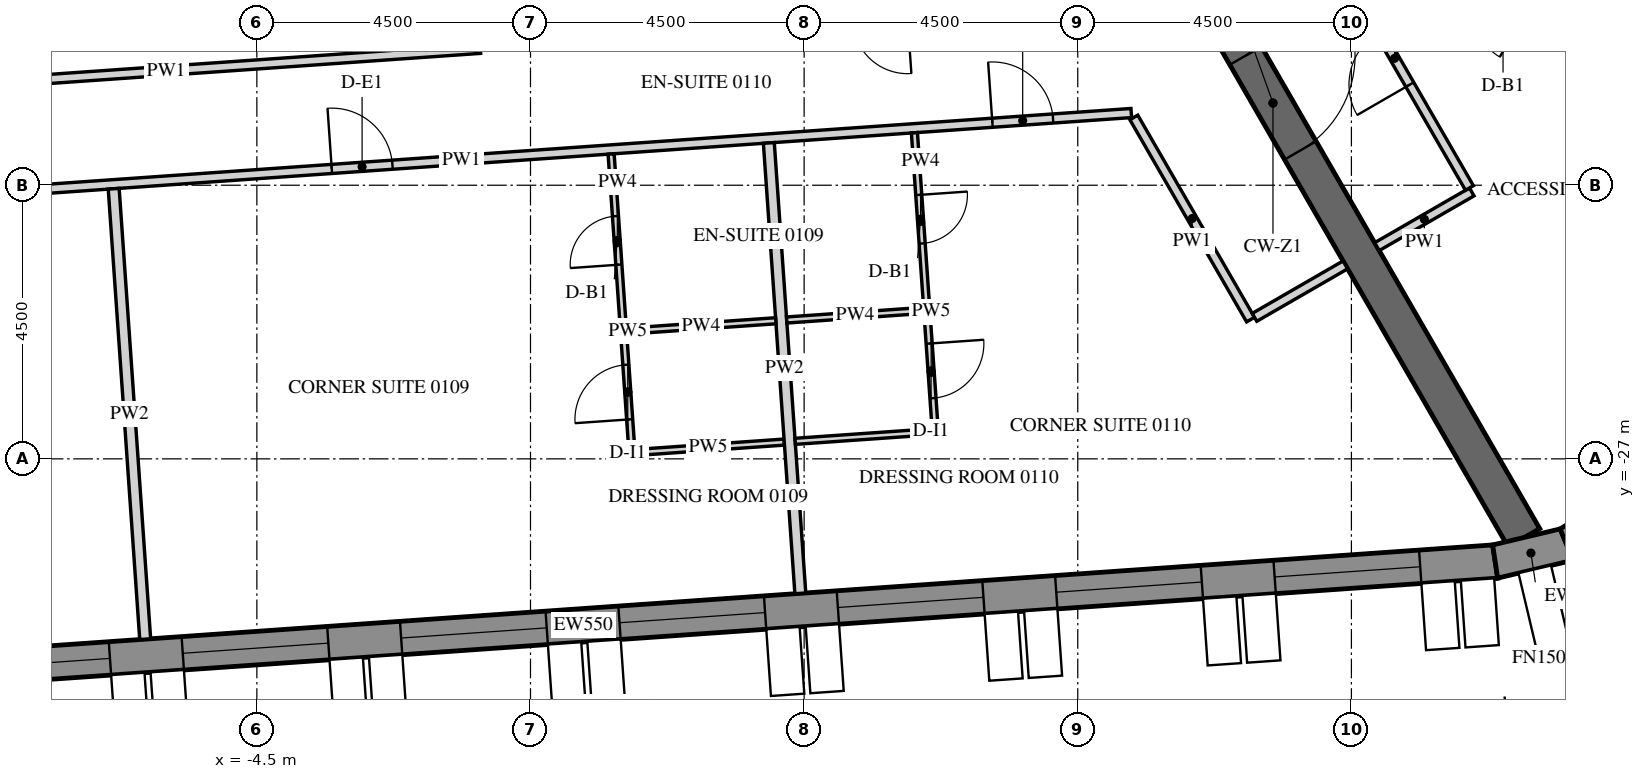
"""IFC4 building model, lengths in metres.
Left out: names, types, materials, properties, quantities, classifications, styles, units other than length and angle.
Written with IfcOpenShell. Run it as: python <this file> out.ifc"""

import sys

from ifc_helpers import new_model, si_unit, direction, frame, frame_2d, origin, place, context, subcontext, project, spatial, polyline, rectangle, outline, extrude, element, fill, save


model = new_model("IFC4")
c1 = context("Model", 3, precision=1e-05, world=origin(), true_north=direction((0.0, 1.0)))
c2 = subcontext(c1, "Body", "Model", "MODEL_VIEW")
j1 = project(units=[si_unit("LENGTHUNIT", "METRE"), si_unit("PLANEANGLEUNIT", "RADIAN")], contexts=[c1])
p1 = place(None, origin())
s1 = spatial("IfcSite", under=j1, at=p1, CompositionType="ELEMENT")
p2 = place(p1, origin())
s2 = spatial("IfcBuilding", under=s1, at=p2, CompositionType="ELEMENT")
p3 = place(p2, frame((0.0, 0.0, 37.5)))
s3 = spatial("IfcBuildingStorey", under=s2, at=p3, CompositionType="ELEMENT", Elevation=37.5)
p4 = place(p3, frame((-14.134, -30.786, -0.15), z_axis=(0.0, 0.0, 1.0), x_axis=(0.997564037441, 0.069756657061, 0.0)))
e1 = element("IfcWall", 1, at=p4, inside=s3, PredefinedType="SOLIDWALL", context=c2, shape_type="SweptSolid", body=[
    extrude(outline(polyline([(-0.026, -0.275), (30.094, -0.275), (30.049, 0.275), (0.026, 0.275), (-0.026, -0.275)])), origin(), (0.0, 0.0, 1.0), 3.9),
])
p5 = place(p4, frame((1.236, 0.0, 1.05)))
e2 = element("IfcOpeningElement", 2, at=p5, cuts=e1, PredefinedType="OPENING", context=c2, shape_type="SweptSolid", body=[
    extrude(rectangle(XDim=2.4, YDim=2.4, at=frame_2d((1.2, 1.2))), frame((0.0, 0.285, 0.0), z_axis=(0.0, -1.0, 0.0), x_axis=(1.0, 0.0, 0.0)), (0.0, 0.0, 1.0), 0.57),
])
p6 = place(p4, frame((4.835, 0.0, 1.05)))
e3 = element("IfcOpeningElement", 3, at=p6, cuts=e1, PredefinedType="OPENING", context=c2, shape_type="SweptSolid", body=[
    extrude(rectangle(XDim=2.4, YDim=2.4, at=frame_2d((1.2, 1.2))), frame((0.0, 0.285, 0.0), z_axis=(0.0, -1.0, 0.0), x_axis=(1.0, 0.0, 0.0)), (0.0, 0.0, 1.0), 0.57),
])
p7 = place(p4, frame((8.436, 0.0, 1.05)))
e4 = element("IfcOpeningElement", 4, at=p7, cuts=e1, PredefinedType="OPENING", context=c2, shape_type="SweptSolid", body=[
    extrude(rectangle(XDim=2.4, YDim=2.4, at=frame_2d((1.2, 1.2))), frame((0.0, 0.285, 0.0), z_axis=(0.0, -1.0, 0.0), x_axis=(1.0, 0.0, 0.0)), (0.0, 0.0, 1.0), 0.57),
])
p8 = place(p4, frame((12.035, 0.0, 1.05)))
e5 = element("IfcOpeningElement", 5, at=p8, cuts=e1, PredefinedType="OPENING", context=c2, shape_type="SweptSolid", body=[
    extrude(rectangle(XDim=2.4, YDim=2.4, at=frame_2d((1.2, 1.2))), frame((0.0, 0.285, 0.0), z_axis=(0.0, -1.0, 0.0), x_axis=(1.0, 0.0, 0.0)), (0.0, 0.0, 1.0), 0.57),
])
p9 = place(p4, frame((15.635, 0.0, 1.05)))
e6 = element("IfcOpeningElement", 6, at=p9, cuts=e1, PredefinedType="OPENING", context=c2, shape_type="SweptSolid", body=[
    extrude(rectangle(XDim=2.4, YDim=2.4, at=frame_2d((1.2, 1.2))), frame((0.0, 0.285, 0.0), z_axis=(0.0, -1.0, 0.0), x_axis=(1.0, 0.0, 0.0)), (0.0, 0.0, 1.0), 0.57),
])
p10 = place(p4, frame((19.236, 0.0, 1.05)))
e7 = element("IfcOpeningElement", 7, at=p10, cuts=e1, PredefinedType="OPENING", context=c2, shape_type="SweptSolid", body=[
    extrude(rectangle(XDim=2.4, YDim=2.4, at=frame_2d((1.2, 1.2))), frame((0.0, 0.285, 0.0), z_axis=(0.0, -1.0, 0.0), x_axis=(1.0, 0.0, 0.0)), (0.0, 0.0, 1.0), 0.57),
])
p11 = place(p4, frame((22.835, 0.0, 1.05)))
e8 = element("IfcOpeningElement", 8, at=p11, cuts=e1, PredefinedType="OPENING", context=c2, shape_type="SweptSolid", body=[
    extrude(rectangle(XDim=2.4, YDim=2.4, at=frame_2d((1.2, 1.2))), frame((0.0, 0.285, 0.0), z_axis=(0.0, -1.0, 0.0), x_axis=(1.0, 0.0, 0.0)), (0.0, 0.0, 1.0), 0.57),
])
p12 = place(p4, frame((26.436, 0.0, 1.05)))
e9 = element("IfcOpeningElement", 9, at=p12, cuts=e1, PredefinedType="OPENING", context=c2, shape_type="SweptSolid", body=[
    extrude(rectangle(XDim=2.4, YDim=2.4, at=frame_2d((1.2, 1.2))), frame((0.0, 0.285, 0.0), z_axis=(0.0, -1.0, 0.0), x_axis=(1.0, 0.0, 0.0)), (0.0, 0.0, 1.0), 0.57),
])
p13 = place(p3, frame((15.864, -28.688, -0.15), z_axis=(0.0, 0.0, 1.0), x_axis=(0.973063591128, 0.230536868247, 0.0)))
e10 = element("IfcWall", 10, at=p13, inside=s3, PredefinedType="SOLIDWALL", context=c2, shape_type="SweptSolid", body=[
    extrude(outline(polyline([(-0.022, -0.275), (1.253, -0.275), (1.163, 0.275), (0.022, 0.275), (-0.022, -0.275)])), origin(), (0.0, 0.0, 1.0), 3.9),
])
p14 = place(p3, frame((17.04, -28.41, -0.15), z_axis=(0.0, 0.0, 1.0), x_axis=(0.847952888306, 0.530071598195, 0.0)))
e11 = element("IfcWall", 11, at=p14, inside=s3, PredefinedType="SOLIDWALL", context=c2, shape_type="SweptSolid", body=[
    extrude(outline(polyline([(-0.045, -0.275), (1.253, -0.275), (1.163, 0.275), (0.045, 0.275), (-0.045, -0.275)])), origin(), (0.0, 0.0, 1.0), 3.9),
])
p15 = place(p3, frame((8.083, -14.0, -0.15), z_axis=(0.0, 0.0, 1.0), x_axis=(0.499997680643, -0.866026742862, 0.0)))
e12 = element("IfcWall", 12, at=p15, inside=s3, PredefinedType="SHEAR", context=c2, shape_type="SweptSolid", body=[
    extrude(rectangle(XDim=16.509, YDim=0.6, at=frame_2d((8.254, 0.0))), origin(), (0.0, 0.0, 1.0), 3.9),
])
p16 = place(p15, frame((7.354, 0.0, 0.15)))
e13 = element("IfcOpeningElement", 13, at=p16, cuts=e12, PredefinedType="OPENING", context=c2, shape_type="SweptSolid", body=[
    extrude(rectangle(XDim=1.8, YDim=2.4, at=frame_2d((0.9, 1.2))), frame((0.0, 0.31, 0.0), z_axis=(0.0, -1.0, 0.0), x_axis=(1.0, 0.0, 0.0)), (0.0, 0.0, 1.0), 0.62),
])
p17 = place(p3, frame((-12.151, -22.853, 0.0), z_axis=(0.0, 0.0, 1.0), x_axis=(0.99756425444, 0.069753553767, 0.0)))
e14 = element("IfcWall", 14, at=p17, inside=s3, PredefinedType="PARTITIONING", context=c2, shape_type="SweptSolid", body=[
    extrude(rectangle(XDim=22.085, YDim=0.15, at=frame_2d((11.042, 0.0))), origin(), (0.0, 0.0, 1.0), 2.988),
])
p18 = place(p17, frame((8.905, 0.0, 0.0)))
e15 = element("IfcOpeningElement", 15, at=p18, cuts=e14, PredefinedType="OPENING", context=c2, shape_type="SweptSolid", body=[
    extrude(rectangle(XDim=1.0, YDim=2.1, at=frame_2d((0.5, 1.05))), frame((0.0, 0.085, 0.0), z_axis=(0.0, -1.0, 0.0), x_axis=(1.0, 0.0, 0.0)), (0.0, 0.0, 1.0), 0.17),
])
p19 = place(p17, frame((19.795, 0.0, 0.0)))
e16 = element("IfcOpeningElement", 16, at=p19, cuts=e14, PredefinedType="OPENING", context=c2, shape_type="SweptSolid", body=[
    extrude(rectangle(XDim=1.0, YDim=2.1, at=frame_2d((0.5, 1.05))), frame((0.0, 0.085, 0.0), z_axis=(0.0, -1.0, 0.0), x_axis=(1.0, 0.0, 0.0)), (0.0, 0.0, 1.0), 0.17),
])
p20 = place(p3, frame((9.922, -21.385, 0.0), z_axis=(0.0, 0.0, 1.0), x_axis=(0.500023335103, -0.866011930837, 0.0)))
e17 = element("IfcWall", 17, at=p20, inside=s3, PredefinedType="PARTITIONING", context=c2, shape_type="SweptSolid", body=[
    extrude(rectangle(XDim=3.84, YDim=0.15, at=frame_2d((1.92, 0.0))), origin(), (0.0, 0.0, 1.0), 2.988),
])
p21 = place(p3, frame((11.906, -24.673, 0.0), z_axis=(0.0, 0.0, 1.0), x_axis=(0.866013532718, 0.500020560727, 0.0)))
e18 = element("IfcWall", 18, at=p21, inside=s3, PredefinedType="PARTITIONING", context=c2, shape_type="SweptSolid", body=[
    extrude(rectangle(XDim=1.725, YDim=0.15, at=frame_2d((0.863, 0.0))), origin(), (0.0, 0.0, 1.0), 2.988),
])
p22 = place(p3, frame((-0.825, -20.257, 0.0), z_axis=(0.0, 0.0, 1.0), x_axis=(-0.9975635143, -0.069764137903, 0.0)))
e19 = element("IfcWall", 19, at=p22, inside=s3, PredefinedType="PARTITIONING", context=c2, shape_type="SweptSolid", body=[
    extrude(rectangle(XDim=10.355, YDim=0.15, at=frame_2d((5.177, 0.0))), origin(), (0.0, 0.0, 1.0), 2.988),
])
p23 = place(p3, frame((13.92, -23.51, 0.0), z_axis=(0.0, 0.0, 1.0), x_axis=(0.866047807691, 0.499961193289, 0.0)))
e20 = element("IfcWall", 20, at=p23, inside=s3, PredefinedType="PARTITIONING", context=c2, shape_type="SweptSolid", body=[
    extrude(rectangle(XDim=1.8, YDim=0.15, at=frame_2d((0.9, 0.0))), origin(), (0.0, 0.0, 1.0), 2.988),
])
p24 = place(p3, frame((15.441, -22.545, 0.0), z_axis=(0.0, 0.0, 1.0), x_axis=(-0.500037089193, 0.86600398927, 0.0)))
e21 = element("IfcWall", 21, at=p24, inside=s3, PredefinedType="PARTITIONING", context=c2, shape_type="SweptSolid", body=[
    extrude(rectangle(XDim=3.112, YDim=0.15, at=frame_2d((1.556, 0.0))), origin(), (0.0, 0.0, 1.0), 2.988),
])
p25 = place(p24, frame((1.962, 0.0, 0.0)))
e22 = element("IfcOpeningElement", 22, at=p25, cuts=e21, PredefinedType="OPENING", context=c2, shape_type="SweptSolid", body=[
    extrude(rectangle(XDim=1.0, YDim=2.1, at=frame_2d((0.5, 1.05))), frame((0.0, 0.085, 0.0), z_axis=(0.0, -1.0, 0.0), x_axis=(1.0, 0.0, 0.0)), (0.0, 0.0, 1.0), 0.17),
])
p26 = place(p3, frame((-6.336, -29.965, 0.0), z_axis=(0.0, 0.0, 1.0), x_axis=(-0.06977252161, 0.997562927954, 0.0)))
e23 = element("IfcWall", 23, at=p26, inside=s3, PredefinedType="PARTITIONING", context=c2, shape_type="SweptSolid", body=[
    extrude(rectangle(XDim=7.425, YDim=0.18, at=frame_2d((3.712, 0.0))), origin(), (0.0, 0.0, 1.0), 2.988),
])
p27 = place(p3, frame((1.53, -24.904, 0.0), z_axis=(0.0, 0.0, 1.0), x_axis=(-0.069775971057, 0.997562686683, 0.0)))
e24 = element("IfcWall", 24, at=p27, inside=s3, PredefinedType="PARTITIONING", context=c2, shape_type="SweptSolid", body=[
    extrude(rectangle(XDim=2.925, YDim=0.1, at=frame_2d((1.462, 0.0))), origin(), (0.0, 0.0, 1.0), 2.988),
])
p28 = place(p27, frame((1.1, 0.0, 0.0)))
e25 = element("IfcOpeningElement", 25, at=p28, cuts=e24, PredefinedType="OPENING", context=c2, shape_type="SweptSolid", body=[
    extrude(rectangle(XDim=0.8, YDim=2.1, at=frame_2d((0.4, 1.05))), frame((0.0, 0.06, 0.0), z_axis=(0.0, -1.0, 0.0), x_axis=(1.0, 0.0, 0.0)), (0.0, 0.0, 1.0), 0.12),
])
p29 = place(p3, frame((4.173, -26.724, 0.0), z_axis=(0.0, 0.0, 1.0), x_axis=(-0.997558425079, -0.069836871022, 0.0)))
e26 = element("IfcWall", 26, at=p29, inside=s3, PredefinedType="PARTITIONING", context=c2, shape_type="SweptSolid", body=[
    extrude(rectangle(XDim=2.51, YDim=0.1, at=frame_2d((1.255, 0.0))), origin(), (0.0, 0.0, 1.0), 2.988),
])
p30 = place(p3, frame((1.666, -26.849, 0.0), z_axis=(0.0, 0.0, 1.0), x_axis=(-0.069776698601, 0.997562635794, 0.0)))
e27 = element("IfcWall", 27, at=p30, inside=s3, PredefinedType="PARTITIONING", context=c2, shape_type="SweptSolid", body=[
    extrude(rectangle(XDim=1.9, YDim=0.1, at=frame_2d((0.95, 0.0))), origin(), (0.0, 0.0, 1.0), 2.988),
])
p31 = place(p30, frame((0.5, 0.0, 0.0)))
e28 = element("IfcOpeningElement", 28, at=p31, cuts=e27, PredefinedType="OPENING", context=c2, shape_type="SweptSolid", body=[
    extrude(rectangle(XDim=0.9, YDim=2.1, at=frame_2d((0.45, 1.05))), frame((0.0, 0.06, 0.0), z_axis=(0.0, -1.0, 0.0), x_axis=(1.0, 0.0, 0.0)), (0.0, 0.0, 1.0), 0.12),
])
p32 = place(p3, frame((4.438, -29.212, 0.0), z_axis=(0.0, 0.0, 1.0), x_axis=(-0.06977252161, 0.997562927954, 0.0)))
e29 = element("IfcWall", 29, at=p32, inside=s3, PredefinedType="PARTITIONING", context=c2, shape_type="SweptSolid", body=[
    extrude(rectangle(XDim=7.425, YDim=0.18, at=frame_2d((3.712, 0.0))), origin(), (0.0, 0.0, 1.0), 2.988),
])
p33 = place(p3, frame((1.58, -24.9, 0.0), z_axis=(0.0, 0.0, 1.0), x_axis=(0.997563389425, 0.069765923475, 0.0)))
e30 = element("IfcWall", 30, at=p33, inside=s3, PredefinedType="PARTITIONING", context=c2, shape_type="SweptSolid", body=[
    extrude(rectangle(XDim=2.46, YDim=0.1, at=frame_2d((1.23, 0.0))), origin(), (0.0, 0.0, 1.0), 2.988),
])
p34 = place(p3, frame((6.314, -21.637, 0.0), z_axis=(0.0, 0.0, 1.0), x_axis=(0.069692912611, -0.997568492852, 0.0)))
e31 = element("IfcWall", 31, at=p34, inside=s3, PredefinedType="PARTITIONING", context=c2, shape_type="SweptSolid", body=[
    extrude(rectangle(XDim=2.925, YDim=0.1, at=frame_2d((1.462, 0.0))), origin(), (0.0, 0.0, 1.0), 2.988),
])
p35 = place(p34, frame((1.025, 0.0, 0.0)))
e32 = element("IfcOpeningElement", 32, at=p35, cuts=e31, PredefinedType="OPENING", context=c2, shape_type="SweptSolid", body=[
    extrude(rectangle(XDim=0.8, YDim=2.1, at=frame_2d((0.4, 1.05))), frame((0.0, 0.06, 0.0), z_axis=(0.0, -1.0, 0.0), x_axis=(1.0, 0.0, 0.0)), (0.0, 0.0, 1.0), 0.12),
])
p36 = place(p3, frame((6.521, -24.605, 0.0), z_axis=(0.0, 0.0, 1.0), x_axis=(0.069734442015, -0.997565590624, 0.0)))
e33 = element("IfcWall", 33, at=p36, inside=s3, PredefinedType="PARTITIONING", context=c2, shape_type="SweptSolid", body=[
    extrude(rectangle(XDim=1.95, YDim=0.1, at=frame_2d((0.975, 0.0))), origin(), (0.0, 0.0, 1.0), 2.988),
])
p37 = place(p36, frame((0.5, 0.0, 0.0)))
e34 = element("IfcOpeningElement", 34, at=p37, cuts=e33, PredefinedType="OPENING", context=c2, shape_type="SweptSolid", body=[
    extrude(rectangle(XDim=0.9, YDim=2.1, at=frame_2d((0.45, 1.05))), frame((0.0, 0.06, 0.0), z_axis=(0.0, -1.0, 0.0), x_axis=(1.0, 0.0, 0.0)), (0.0, 0.0, 1.0), 0.12),
])
for number, where, z_axis, x_axis in (
    (35, (6.607, -26.554, 0.0), (0.0, 0.0, 1.0), (-0.998, -0.07, 0.0)),
    (36, (4.213, -24.716, 0.0), (0.0, 0.0, 1.0), (0.998, 0.07, 0.0)),
):
    element("IfcWall", number, at=place(p3, frame(where, z_axis=z_axis, x_axis=x_axis)), inside=s3, PredefinedType="PARTITIONING", context=c2, shape_type="SweptSolid", body=[
        extrude(rectangle(XDim=2.26, YDim=0.1, at=frame_2d((1.13, 0.0))), origin(), (0.0, 0.0, 1.0), 2.988),
    ])
p38 = place(p6, frame((0.0, 0.205, 0.0)))
e37 = element("IfcWindow", 37, at=p38, inside=s3, PartitioningType="DOUBLE_PANEL_VERTICAL", PredefinedType="WINDOW", context=c2, shape_type="SweptSolid", body=[
    extrude(rectangle(XDim=2.4, YDim=2.4, at=frame_2d((1.2, 1.2))), frame((0.0, 0.03, 0.0), z_axis=(0.0, -1.0, 0.0), x_axis=(1.0, 0.0, 0.0)), (0.0, 0.0, 1.0), 0.06),
])
fill(e3, e37)
p39 = place(p7, frame((0.0, 0.205, 0.0)))
e38 = element("IfcWindow", 38, at=p39, inside=s3, PartitioningType="DOUBLE_PANEL_VERTICAL", PredefinedType="WINDOW", context=c2, shape_type="SweptSolid", body=[
    extrude(rectangle(XDim=2.4, YDim=2.4, at=frame_2d((1.2, 1.2))), frame((0.0, 0.03, 0.0), z_axis=(0.0, -1.0, 0.0), x_axis=(1.0, 0.0, 0.0)), (0.0, 0.0, 1.0), 0.06),
])
fill(e4, e38)
p40 = place(p8, frame((0.0, 0.205, 0.0)))
e39 = element("IfcWindow", 39, at=p40, inside=s3, PartitioningType="DOUBLE_PANEL_VERTICAL", PredefinedType="WINDOW", context=c2, shape_type="SweptSolid", body=[
    extrude(rectangle(XDim=2.4, YDim=2.4, at=frame_2d((1.2, 1.2))), frame((0.0, 0.03, 0.0), z_axis=(0.0, -1.0, 0.0), x_axis=(1.0, 0.0, 0.0)), (0.0, 0.0, 1.0), 0.06),
])
fill(e5, e39)
p41 = place(p9, frame((0.0, 0.205, 0.0)))
e40 = element("IfcWindow", 40, at=p41, inside=s3, PartitioningType="DOUBLE_PANEL_VERTICAL", PredefinedType="WINDOW", context=c2, shape_type="SweptSolid", body=[
    extrude(rectangle(XDim=2.4, YDim=2.4, at=frame_2d((1.2, 1.2))), frame((0.0, 0.03, 0.0), z_axis=(0.0, -1.0, 0.0), x_axis=(1.0, 0.0, 0.0)), (0.0, 0.0, 1.0), 0.06),
])
fill(e6, e40)
p42 = place(p10, frame((0.0, 0.205, 0.0)))
e41 = element("IfcWindow", 41, at=p42, inside=s3, PartitioningType="DOUBLE_PANEL_VERTICAL", PredefinedType="WINDOW", context=c2, shape_type="SweptSolid", body=[
    extrude(rectangle(XDim=2.4, YDim=2.4, at=frame_2d((1.2, 1.2))), frame((0.0, 0.03, 0.0), z_axis=(0.0, -1.0, 0.0), x_axis=(1.0, 0.0, 0.0)), (0.0, 0.0, 1.0), 0.06),
])
fill(e7, e41)
p43 = place(p11, frame((0.0, 0.205, 0.0)))
e42 = element("IfcWindow", 42, at=p43, inside=s3, PartitioningType="DOUBLE_PANEL_VERTICAL", PredefinedType="WINDOW", context=c2, shape_type="SweptSolid", body=[
    extrude(rectangle(XDim=2.4, YDim=2.4, at=frame_2d((1.2, 1.2))), frame((0.0, 0.03, 0.0), z_axis=(0.0, -1.0, 0.0), x_axis=(1.0, 0.0, 0.0)), (0.0, 0.0, 1.0), 0.06),
])
fill(e8, e42)
p44 = place(p12, frame((0.0, 0.205, 0.0)))
e43 = element("IfcWindow", 43, at=p44, inside=s3, PartitioningType="DOUBLE_PANEL_VERTICAL", PredefinedType="WINDOW", context=c2, shape_type="SweptSolid", body=[
    extrude(rectangle(XDim=2.4, YDim=2.4, at=frame_2d((1.2, 1.2))), frame((0.0, 0.03, 0.0), z_axis=(0.0, -1.0, 0.0), x_axis=(1.0, 0.0, 0.0)), (0.0, 0.0, 1.0), 0.06),
])
fill(e9, e43)
p45 = place(p16, origin())
e44 = element("IfcDoor", 44, at=p45, inside=s3, OperationType="DOUBLE_DOOR_SINGLE_SWING", PredefinedType="DOOR", context=c2, shape_type="SweptSolid", body=[
    extrude(rectangle(XDim=1.8, YDim=2.4, at=frame_2d((0.9, 1.2))), frame((0.0, 0.025, 0.0), z_axis=(0.0, -1.0, 0.0), x_axis=(1.0, 0.0, 0.0)), (0.0, 0.0, 1.0), 0.05),
])
fill(e13, e44)
p46 = place(p18, origin())
e45 = element("IfcDoor", 45, at=p46, inside=s3, OperationType="SINGLE_SWING_RIGHT", PredefinedType="DOOR", context=c2, shape_type="SweptSolid", body=[
    extrude(rectangle(XDim=1.0, YDim=2.1, at=frame_2d((0.5, 1.05))), frame((0.0, 0.025, 0.0), z_axis=(0.0, -1.0, 0.0), x_axis=(1.0, 0.0, 0.0)), (0.0, 0.0, 1.0), 0.05),
])
fill(e15, e45)
p47 = place(p28, origin())
e46 = element("IfcDoor", 46, at=p47, inside=s3, OperationType="SINGLE_SWING_LEFT", PredefinedType="DOOR", context=c2, shape_type="SweptSolid", body=[
    extrude(rectangle(XDim=0.8, YDim=2.1, at=frame_2d((0.4, 1.05))), frame((0.0, 0.025, 0.0), z_axis=(0.0, -1.0, 0.0), x_axis=(1.0, 0.0, 0.0)), (0.0, 0.0, 1.0), 0.05),
])
fill(e25, e46)
p48 = place(p31, origin())
e47 = element("IfcDoor", 47, at=p48, inside=s3, OperationType="SINGLE_SWING_RIGHT", PredefinedType="DOOR", context=c2, shape_type="SweptSolid", body=[
    extrude(rectangle(XDim=0.9, YDim=2.1, at=frame_2d((0.45, 1.05))), frame((0.0, 0.025, 0.0), z_axis=(0.0, -1.0, 0.0), x_axis=(1.0, 0.0, 0.0)), (0.0, 0.0, 1.0), 0.05),
])
fill(e28, e47)
p49 = place(p19, origin())
e48 = element("IfcDoor", 48, at=p49, inside=s3, OperationType="SINGLE_SWING_LEFT", PredefinedType="DOOR", context=c2, shape_type="SweptSolid", body=[
    extrude(rectangle(XDim=1.0, YDim=2.1, at=frame_2d((0.5, 1.05))), frame((0.0, 0.025, 0.0), z_axis=(0.0, -1.0, 0.0), x_axis=(1.0, 0.0, 0.0)), (0.0, 0.0, 1.0), 0.05),
])
fill(e16, e48)
p50 = place(p35, origin())
e49 = element("IfcDoor", 49, at=p50, inside=s3, OperationType="SINGLE_SWING_RIGHT", PredefinedType="DOOR", context=c2, shape_type="SweptSolid", body=[
    extrude(rectangle(XDim=0.8, YDim=2.1, at=frame_2d((0.4, 1.05))), frame((0.0, 0.025, 0.0), z_axis=(0.0, -1.0, 0.0), x_axis=(1.0, 0.0, 0.0)), (0.0, 0.0, 1.0), 0.05),
])
fill(e32, e49)
p51 = place(p37, origin())
e50 = element("IfcDoor", 50, at=p51, inside=s3, OperationType="SINGLE_SWING_RIGHT", PredefinedType="DOOR", context=c2, shape_type="SweptSolid", body=[
    extrude(rectangle(XDim=0.9, YDim=2.1, at=frame_2d((0.45, 1.05))), frame((0.0, 0.025, 0.0), z_axis=(0.0, -1.0, 0.0), x_axis=(1.0, 0.0, 0.0)), (0.0, 0.0, 1.0), 0.05),
])
fill(e34, e50)
p52 = place(p25, origin())
e51 = element("IfcDoor", 51, at=p52, inside=s3, OperationType="SINGLE_SWING_LEFT", PredefinedType="DOOR", context=c2, shape_type="SweptSolid", body=[
    extrude(rectangle(XDim=1.0, YDim=2.1, at=frame_2d((0.5, 1.05))), frame((0.0, 0.025, 0.0), z_axis=(0.0, -1.0, 0.0), x_axis=(1.0, 0.0, 0.0)), (0.0, 0.0, 1.0), 0.05),
])
fill(e22, e51)
save(model, sys.argv[1])
